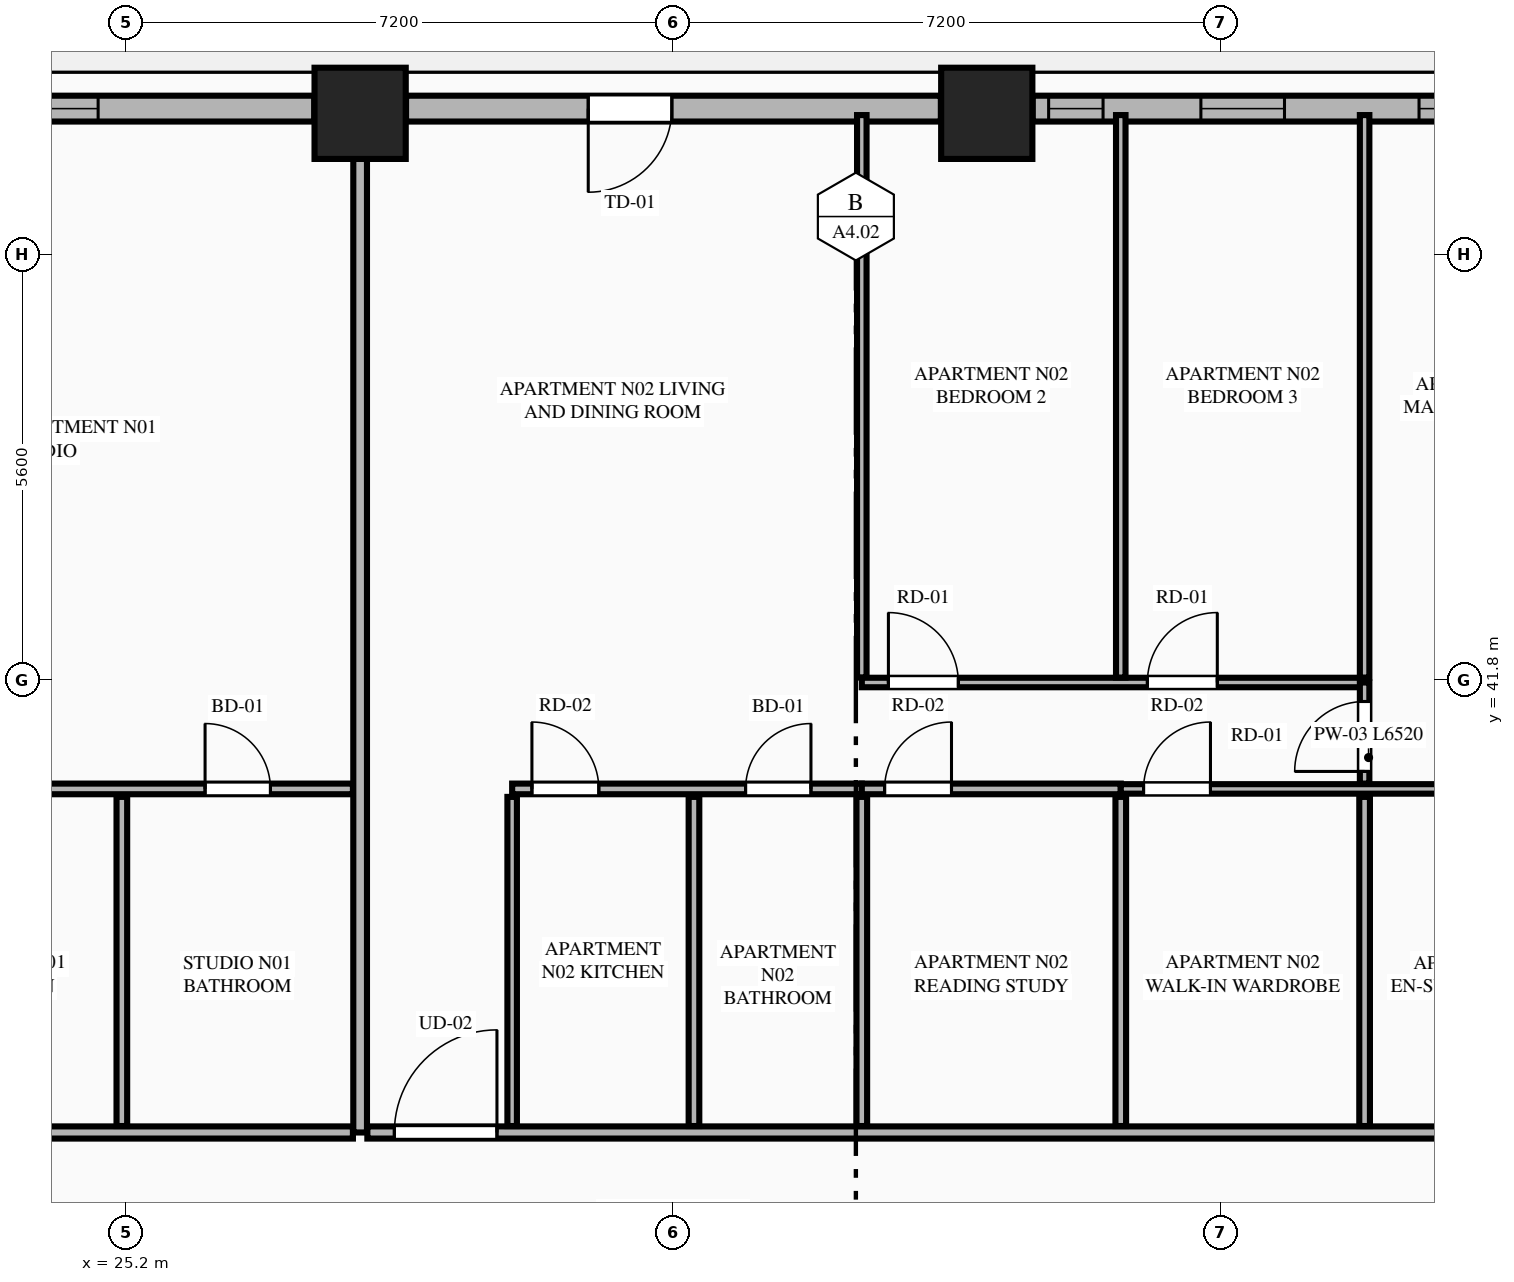
"""IFC4 building model, lengths in metres.
Left out: names, types, materials, properties, quantities, classifications, styles, units other than length and angle.
Written with IfcOpenShell. Run it as: python <this file> out.ifc"""

import sys

from ifc_helpers import new_model, si_unit, direction, frame, frame_2d, origin, origin_2d, place, context, subcontext, project, spatial, rectangle, extrude, element, fill, save


model = new_model("IFC4")
c1 = context("Model", 3, precision=1e-05, world=origin(), true_north=direction((0.0, 1.0)))
c2 = subcontext(c1, "Body", "Model", "MODEL_VIEW")
j1 = project(units=[si_unit("LENGTHUNIT", "METRE"), si_unit("PLANEANGLEUNIT", "RADIAN")], contexts=[c1])
p1 = place(None, origin())
s1 = spatial("IfcSite", under=j1, at=p1, CompositionType="ELEMENT")
p2 = place(p1, origin())
s2 = spatial("IfcBuilding", under=s1, at=p2, CompositionType="ELEMENT")
p3 = place(p2, frame((0.0, 0.0, 49.75)))
s3 = spatial("IfcBuildingStorey", under=s2, at=p3, CompositionType="ELEMENT", Elevation=49.75)
for number, where, z_axis, x_axis in (
    (1, (36.522, 49.258, 0.0), (0.0, 0.0, 1.0), (1.0, 0.0, 0.0)),
    (2, (28.278, 49.258, 0.0), (0.0, 0.0, 1.0), (1.0, 0.0, 0.0)),
):
    element("IfcColumn", number, at=place(p3, frame(where, z_axis=z_axis, x_axis=x_axis)), inside=s3, PredefinedType="COLUMN", context=c2, shape_type="SweptSolid", body=[
        extrude(rectangle(XDim=1.2, YDim=1.2, at=origin_2d()), origin(), (0.0, 0.0, 1.0), 3.55),
    ])
p4 = place(p3, frame((43.913, 49.32, 0.0), z_axis=(0.0, 0.0, 1.0), x_axis=(-1.0, 0.0, 0.0)))
e3 = element("IfcWall", 3, at=p4, inside=s3, PredefinedType="STANDARD", context=c2, shape_type="SweptSolid", body=[
    extrude(rectangle(XDim=6.787, YDim=0.34, at=frame_2d((3.394, 0.0))), origin(), (0.0, 0.0, 1.0), 2.787),
])
p5 = place(p4, frame((0.604, 0.0, 0.75)))
e4 = element("IfcOpeningElement", 4, at=p5, cuts=e3, PredefinedType="OPENING", context=c2, shape_type="SweptSolid", body=[
    extrude(rectangle(XDim=1.1, YDim=1.887, at=frame_2d((0.55, 0.943))), frame((0.0, 0.18, 0.0), z_axis=(0.0, -1.0, 0.0), x_axis=(1.0, 0.0, 0.0)), (0.0, 0.0, 1.0), 0.36),
])
p6 = place(p4, frame((3.474, 0.0, 0.75)))
e5 = element("IfcOpeningElement", 5, at=p6, cuts=e3, PredefinedType="OPENING", context=c2, shape_type="SweptSolid", body=[
    extrude(rectangle(XDim=1.1, YDim=1.887, at=frame_2d((0.55, 0.943))), frame((0.0, 0.18, 0.0), z_axis=(0.0, -1.0, 0.0), x_axis=(1.0, 0.0, 0.0)), (0.0, 0.0, 1.0), 0.36),
])
p7 = place(p4, frame((5.861, 0.0, 0.75)))
e6 = element("IfcOpeningElement", 6, at=p7, cuts=e3, PredefinedType="OPENING", context=c2, shape_type="SweptSolid", body=[
    extrude(rectangle(XDim=0.716, YDim=1.887, at=frame_2d((0.358, 0.943))), frame((0.0, 0.18, 0.0), z_axis=(0.0, -1.0, 0.0), x_axis=(1.0, 0.0, 0.0)), (0.0, 0.0, 1.0), 0.36),
])
p8 = place(p3, frame((35.918, 49.32, 0.0), z_axis=(0.0, 0.0, 1.0), x_axis=(-1.0, 0.0, 0.0)))
e7 = element("IfcWall", 7, at=p8, inside=s3, PredefinedType="STANDARD", context=c2, shape_type="SweptSolid", body=[
    extrude(rectangle(XDim=7.036, YDim=0.34, at=frame_2d((3.518, 0.0))), origin(), (0.0, 0.0, 1.0), 2.787),
])
p9 = place(p8, frame((3.539, 0.0, 0.0)))
e8 = element("IfcOpeningElement", 8, at=p9, cuts=e7, PredefinedType="OPENING", context=c2, shape_type="SweptSolid", body=[
    extrude(rectangle(XDim=1.1, YDim=2.25, at=frame_2d((0.55, 1.125))), frame((0.0, 0.18, 0.0), z_axis=(0.0, -1.0, 0.0), x_axis=(1.0, 0.0, 0.0)), (0.0, 0.0, 1.0), 0.36),
])
p10 = place(p3, frame((27.674, 49.32, 0.0), z_axis=(0.0, 0.0, 1.0), x_axis=(-1.0, 0.0, 0.0)))
e9 = element("IfcWall", 9, at=p10, inside=s3, PredefinedType="STANDARD", context=c2, shape_type="SweptSolid", body=[
    extrude(rectangle(XDim=6.787, YDim=0.34, at=frame_2d((3.394, 0.0))), origin(), (0.0, 0.0, 1.0), 2.787),
])
p11 = place(p10, frame((2.843, 0.0, 0.75)))
e10 = element("IfcOpeningElement", 10, at=p11, cuts=e9, PredefinedType="OPENING", context=c2, shape_type="SweptSolid", body=[
    extrude(rectangle(XDim=1.1, YDim=1.887, at=frame_2d((0.55, 0.943))), frame((0.0, 0.18, 0.0), z_axis=(0.0, -1.0, 0.0), x_axis=(1.0, 0.0, 0.0)), (0.0, 0.0, 1.0), 0.36),
])
p12 = place(p3, frame((28.278, 35.85, 0.0), z_axis=(0.0, 0.0, 1.0), x_axis=(0.0, 1.0, 0.0)))
e11 = element("IfcWall", 11, at=p12, inside=s3, PredefinedType="PARTITIONING", context=c2, shape_type="SweptSolid", body=[
    extrude(rectangle(XDim=13.295, YDim=0.18, at=frame_2d((6.647, 0.0))), origin(), (0.0, 0.0, 1.0), 2.7),
])
p13 = place(p3, frame((19.995, 35.85, 0.0), z_axis=(0.0, 0.0, 1.0), x_axis=(1.0, 0.0, 0.0)))
e12 = element("IfcWall", 12, at=p13, inside=s3, PredefinedType="PARTITIONING", context=c2, shape_type="SweptSolid", body=[
    extrude(rectangle(XDim=8.188, YDim=0.16, at=frame_2d((4.094, 0.0))), origin(), (0.0, 0.0, 1.0), 3.33),
])
p14 = place(p13, frame((0.705, 0.0, 0.0)))
e13 = element("IfcOpeningElement", 13, at=p14, cuts=e12, PredefinedType="OPENING", context=c2, shape_type="SweptSolid", body=[
    extrude(rectangle(XDim=1.02, YDim=2.25, at=frame_2d((0.51, 1.125))), frame((0.0, 0.09, 0.0), z_axis=(0.0, -1.0, 0.0), x_axis=(1.0, 0.0, 0.0)), (0.0, 0.0, 1.0), 0.18),
])
p15 = place(p3, frame((22.25, 40.37, 0.0), z_axis=(0.0, 0.0, 1.0), x_axis=(1.0, 0.0, 0.0)))
e14 = element("IfcWall", 14, at=p15, inside=s3, PredefinedType="PLUMBINGWALL", context=c2, shape_type="SweptSolid", body=[
    extrude(rectangle(XDim=5.933, YDim=0.14, at=frame_2d((2.967, 0.0))), origin(), (0.0, 0.0, 1.0), 3.33),
])
p16 = place(p15, frame((3.988, 0.0, 0.0)))
e15 = element("IfcOpeningElement", 15, at=p16, cuts=e14, PredefinedType="OPENING", context=c2, shape_type="SweptSolid", body=[
    extrude(rectangle(XDim=0.86, YDim=2.1, at=frame_2d((0.43, 1.05))), frame((0.0, 0.08, 0.0), z_axis=(0.0, -1.0, 0.0), x_axis=(1.0, 0.0, 0.0)), (0.0, 0.0, 1.0), 0.16),
])
p17 = place(p15, frame((0.22, 0.0, 0.0)))
e16 = element("IfcOpeningElement", 16, at=p17, cuts=e14, PredefinedType="OPENING", context=c2, shape_type="SweptSolid", body=[
    extrude(rectangle(XDim=0.88, YDim=2.15, at=frame_2d((0.44, 1.075))), frame((0.0, 0.08, 0.0), z_axis=(0.0, -1.0, 0.0), x_axis=(1.0, 0.0, 0.0)), (0.0, 0.0, 1.0), 0.16),
])
p18 = place(p3, frame((25.143, 35.935, 0.0), z_axis=(0.0, 0.0, 1.0), x_axis=(0.0, 1.0, 0.0)))
e17 = element("IfcWall", 17, at=p18, inside=s3, PredefinedType="PLUMBINGWALL", context=c2, shape_type="SweptSolid", body=[
    extrude(rectangle(XDim=4.33, YDim=0.14, at=frame_2d((2.165, 0.0))), origin(), (0.0, 0.0, 1.0), 3.33),
])
p19 = place(p3, frame((28.373, 35.85, 0.0), z_axis=(0.0, 0.0, 1.0), x_axis=(1.0, 0.0, 0.0)))
e18 = element("IfcWall", 18, at=p19, inside=s3, PredefinedType="PARTITIONING", context=c2, shape_type="SweptSolid", body=[
    extrude(rectangle(XDim=16.432, YDim=0.16, at=frame_2d((8.216, 0.0))), origin(), (0.0, 0.0, 1.0), 3.33),
])
p20 = place(p19, frame((0.355, 0.0, 0.0)))
e19 = element("IfcOpeningElement", 19, at=p20, cuts=e18, PredefinedType="OPENING", context=c2, shape_type="SweptSolid", body=[
    extrude(rectangle(XDim=1.35, YDim=2.35, at=frame_2d((0.675, 1.175))), frame((0.0, 0.09, 0.0), z_axis=(0.0, -1.0, 0.0), x_axis=(1.0, 0.0, 0.0)), (0.0, 0.0, 1.0), 0.18),
])
p21 = place(p3, frame((30.278, 35.935, 0.0), z_axis=(0.0, 0.0, 1.0), x_axis=(0.0, 1.0, 0.0)))
e20 = element("IfcWall", 20, at=p21, inside=s3, PredefinedType="PARTITIONING", context=c2, shape_type="SweptSolid", body=[
    extrude(rectangle(XDim=4.33, YDim=0.125, at=frame_2d((2.165, 0.0))), origin(), (0.0, 0.0, 1.0), 3.33),
])
p22 = place(p3, frame((30.278, 40.37, 0.0), z_axis=(0.0, 0.0, 1.0), x_axis=(1.0, 0.0, 0.0)))
e21 = element("IfcWall", 21, at=p22, inside=s3, PredefinedType="PLUMBINGWALL", context=c2, shape_type="SweptSolid", body=[
    extrude(rectangle(XDim=4.6, YDim=0.14, at=frame_2d((2.3, 0.0))), origin(), (0.0, 0.0, 1.0), 3.33),
])
p23 = place(p22, frame((3.071, 0.0, 0.0)))
e22 = element("IfcOpeningElement", 22, at=p23, cuts=e21, PredefinedType="OPENING", context=c2, shape_type="SweptSolid", body=[
    extrude(rectangle(XDim=0.86, YDim=2.1, at=frame_2d((0.43, 1.05))), frame((0.0, 0.08, 0.0), z_axis=(0.0, -1.0, 0.0), x_axis=(1.0, 0.0, 0.0)), (0.0, 0.0, 1.0), 0.16),
])
p24 = place(p22, frame((0.26, 0.0, 0.0)))
e23 = element("IfcOpeningElement", 23, at=p24, cuts=e21, PredefinedType="OPENING", context=c2, shape_type="SweptSolid", body=[
    extrude(rectangle(XDim=0.88, YDim=2.15, at=frame_2d((0.44, 1.075))), frame((0.0, 0.08, 0.0), z_axis=(0.0, -1.0, 0.0), x_axis=(1.0, 0.0, 0.0)), (0.0, 0.0, 1.0), 0.16),
])
p25 = place(p3, frame((34.878, 40.37, 0.0), z_axis=(0.0, 0.0, 1.0), x_axis=(1.0, 0.0, 0.0)))
e24 = element("IfcWall", 24, at=p25, inside=s3, PredefinedType="PLUMBINGWALL", context=c2, shape_type="SweptSolid", body=[
    extrude(rectangle(XDim=3.407, YDim=0.14, at=frame_2d((1.704, 0.0))), origin(), (0.0, 0.0, 1.0), 3.33),
])
p26 = place(p25, frame((0.3, 0.0, 0.0)))
e25 = element("IfcOpeningElement", 25, at=p26, cuts=e24, PredefinedType="OPENING", context=c2, shape_type="SweptSolid", body=[
    extrude(rectangle(XDim=0.88, YDim=2.15, at=frame_2d((0.44, 1.075))), frame((0.0, 0.08, 0.0), z_axis=(0.0, -1.0, 0.0), x_axis=(1.0, 0.0, 0.0)), (0.0, 0.0, 1.0), 0.16),
])
p27 = place(p3, frame((38.285, 40.37, 0.0), z_axis=(0.0, 0.0, 1.0), x_axis=(1.0, 0.0, 0.0)))
e26 = element("IfcWall", 26, at=p27, inside=s3, PredefinedType="PARTITIONING", context=c2, shape_type="SweptSolid", body=[
    extrude(rectangle(XDim=6.52, YDim=0.125, at=frame_2d((3.26, 0.0))), origin(), (0.0, 0.0, 1.0), 3.33),
])
p28 = place(p27, frame((4.439, 0.0, 0.0)))
e27 = element("IfcOpeningElement", 27, at=p28, cuts=e26, PredefinedType="OPENING", context=c2, shape_type="SweptSolid", body=[
    extrude(rectangle(XDim=0.86, YDim=2.1, at=frame_2d((0.43, 1.05))), frame((0.0, 0.073, 0.0), z_axis=(0.0, -1.0, 0.0), x_axis=(1.0, 0.0, 0.0)), (0.0, 0.0, 1.0), 0.145),
])
p29 = place(p27, frame((0.3, 0.0, 0.0)))
e28 = element("IfcOpeningElement", 28, at=p29, cuts=e26, PredefinedType="OPENING", context=c2, shape_type="SweptSolid", body=[
    extrude(rectangle(XDim=0.88, YDim=2.15, at=frame_2d((0.44, 1.075))), frame((0.0, 0.073, 0.0), z_axis=(0.0, -1.0, 0.0), x_axis=(1.0, 0.0, 0.0)), (0.0, 0.0, 1.0), 0.145),
])
p30 = place(p3, frame((32.67, 35.935, 0.0), z_axis=(0.0, 0.0, 1.0), x_axis=(0.0, 1.0, 0.0)))
e29 = element("IfcWall", 29, at=p30, inside=s3, PredefinedType="PLUMBINGWALL", context=c2, shape_type="SweptSolid", body=[
    extrude(rectangle(XDim=4.33, YDim=0.14, at=frame_2d((2.165, 0.0))), origin(), (0.0, 0.0, 1.0), 3.33),
])
p31 = place(p3, frame((34.878, 41.835, 0.0), z_axis=(0.0, 0.0, 1.0), x_axis=(0.0, 1.0, 0.0)))
e30 = element("IfcWall", 30, at=p31, inside=s3, PredefinedType="PARTITIONING", context=c2, shape_type="SweptSolid", body=[
    extrude(rectangle(XDim=7.4, YDim=0.125, at=frame_2d((3.7, 0.0))), origin(), (0.0, 0.0, 1.0), 3.33),
])
p32 = place(p3, frame((34.878, 41.77, 0.0), z_axis=(0.0, 0.0, 1.0), x_axis=(1.0, 0.0, 0.0)))
e31 = element("IfcWall", 31, at=p32, inside=s3, PredefinedType="PARTITIONING", context=c2, shape_type="SweptSolid", body=[
    extrude(rectangle(XDim=6.615, YDim=0.125, at=frame_2d((3.308, 0.0))), origin(), (0.0, 0.0, 1.0), 3.33),
])
p33 = place(p32, frame((0.35, 0.0, 0.0)))
e32 = element("IfcOpeningElement", 32, at=p33, cuts=e31, PredefinedType="OPENING", context=c2, shape_type="SweptSolid", body=[
    extrude(rectangle(XDim=0.92, YDim=2.15, at=frame_2d((0.46, 1.075))), frame((0.0, 0.073, 0.0), z_axis=(0.0, -1.0, 0.0), x_axis=(1.0, 0.0, 0.0)), (0.0, 0.0, 1.0), 0.145),
])
p34 = place(p32, frame((3.757, 0.0, 0.0)))
e33 = element("IfcOpeningElement", 33, at=p34, cuts=e31, PredefinedType="OPENING", context=c2, shape_type="SweptSolid", body=[
    extrude(rectangle(XDim=0.92, YDim=2.15, at=frame_2d((0.46, 1.075))), frame((0.0, 0.073, 0.0), z_axis=(0.0, -1.0, 0.0), x_axis=(1.0, 0.0, 0.0)), (0.0, 0.0, 1.0), 0.145),
])
p35 = place(p3, frame((41.493, 40.44, 0.0), z_axis=(0.0, 0.0, 1.0), x_axis=(0.0, 1.0, 0.0)))
e34 = element("IfcWall", 34, at=p35, inside=s3, PredefinedType="PARTITIONING", context=c2, shape_type="SweptSolid", body=[
    extrude(rectangle(XDim=1.33, YDim=0.125, at=frame_2d((0.665, 0.0))), origin(), (0.0, 0.0, 1.0), 3.33),
])
p36 = place(p35, frame((0.16, 0.0, 0.0)))
e35 = element("IfcOpeningElement", 35, at=p36, cuts=e34, PredefinedType="OPENING", context=c2, shape_type="SweptSolid", body=[
    extrude(rectangle(XDim=0.92, YDim=2.15, at=frame_2d((0.46, 1.075))), frame((0.0, 0.073, 0.0), z_axis=(0.0, -1.0, 0.0), x_axis=(1.0, 0.0, 0.0)), (0.0, 0.0, 1.0), 0.145),
])
for number, where, z_axis, x_axis in (
    (36, (34.878, 35.935, 0.0), (0.0, 0.0, 1.0), (0.0, 1.0, 0.0)),
    (37, (38.285, 35.935, 0.0), (0.0, 0.0, 1.0), (0.0, 1.0, 0.0)),
):
    element("IfcWall", number, at=place(p3, frame(where, z_axis=z_axis, x_axis=x_axis)), inside=s3, PredefinedType="PLUMBINGWALL", context=c2, shape_type="SweptSolid", body=[
        extrude(rectangle(XDim=4.33, YDim=0.14, at=frame_2d((2.165, 0.0))), origin(), (0.0, 0.0, 1.0), 3.33),
    ])
for number, where, z_axis, x_axis in (
    (38, (38.285, 41.835, 0.0), (0.0, 0.0, 1.0), (0.0, 1.0, 0.0)),
    (39, (41.493, 41.835, 0.0), (0.0, 0.0, 1.0), (0.0, 1.0, 0.0)),
):
    element("IfcWall", number, at=place(p3, frame(where, z_axis=z_axis, x_axis=x_axis)), inside=s3, PredefinedType="PARTITIONING", context=c2, shape_type="SweptSolid", body=[
        extrude(rectangle(XDim=7.4, YDim=0.125, at=frame_2d((3.7, 0.0))), origin(), (0.0, 0.0, 1.0), 3.33),
    ])
p37 = place(p3, frame((41.493, 35.935, 0.0), z_axis=(0.0, 0.0, 1.0), x_axis=(0.0, 1.0, 0.0)))
e40 = element("IfcWall", 40, at=p37, inside=s3, PredefinedType="PLUMBINGWALL", context=c2, shape_type="SweptSolid", body=[
    extrude(rectangle(XDim=4.33, YDim=0.14, at=frame_2d((2.165, 0.0))), origin(), (0.0, 0.0, 1.0), 3.33),
])
p38 = place(p5, origin())
e41 = element("IfcWindow", 41, at=p38, inside=s3, PartitioningType="SINGLE_PANEL", PredefinedType="WINDOW", context=c2, shape_type="SweptSolid", body=[
    extrude(rectangle(XDim=1.1, YDim=1.887, at=frame_2d((0.55, 0.943))), frame((0.0, 0.03, 0.0), z_axis=(0.0, -1.0, 0.0), x_axis=(1.0, 0.0, 0.0)), (0.0, 0.0, 1.0), 0.06),
])
fill(e4, e41)
p39 = place(p9, origin())
e42 = element("IfcDoor", 42, at=p39, inside=s3, OperationType="SINGLE_SWING_RIGHT", PredefinedType="DOOR", context=c2, shape_type="SweptSolid", body=[
    extrude(rectangle(XDim=1.1, YDim=2.25, at=frame_2d((0.55, 1.125))), frame((0.0, 0.025, 0.0), z_axis=(0.0, -1.0, 0.0), x_axis=(1.0, 0.0, 0.0)), (0.0, 0.0, 1.0), 0.05),
])
fill(e8, e42)
p40 = place(p11, origin())
e43 = element("IfcWindow", 43, at=p40, inside=s3, PartitioningType="SINGLE_PANEL", PredefinedType="WINDOW", context=c2, shape_type="SweptSolid", body=[
    extrude(rectangle(XDim=1.1, YDim=1.887, at=frame_2d((0.55, 0.943))), frame((0.0, 0.03, 0.0), z_axis=(0.0, -1.0, 0.0), x_axis=(1.0, 0.0, 0.0)), (0.0, 0.0, 1.0), 0.06),
])
fill(e10, e43)
p41 = place(p16, origin())
e44 = element("IfcDoor", 44, at=p41, inside=s3, OperationType="SINGLE_SWING_LEFT", PredefinedType="DOOR", context=c2, shape_type="SweptSolid", body=[
    extrude(rectangle(XDim=0.86, YDim=2.1, at=frame_2d((0.43, 1.05))), frame((0.0, 0.025, 0.0), z_axis=(0.0, -1.0, 0.0), x_axis=(1.0, 0.0, 0.0)), (0.0, 0.0, 1.0), 0.05),
])
fill(e15, e44)
p42 = place(p23, origin())
e45 = element("IfcDoor", 45, at=p42, inside=s3, OperationType="SINGLE_SWING_RIGHT", PredefinedType="DOOR", context=c2, shape_type="SweptSolid", body=[
    extrude(rectangle(XDim=0.86, YDim=2.1, at=frame_2d((0.43, 1.05))), frame((0.0, 0.025, 0.0), z_axis=(0.0, -1.0, 0.0), x_axis=(1.0, 0.0, 0.0)), (0.0, 0.0, 1.0), 0.05),
])
fill(e22, e45)
p43 = place(p20, origin())
e46 = element("IfcDoor", 46, at=p43, inside=s3, OperationType="SINGLE_SWING_RIGHT", PredefinedType="DOOR", context=c2, shape_type="SweptSolid", body=[
    extrude(rectangle(XDim=1.35, YDim=2.35, at=frame_2d((0.675, 1.175))), frame((0.0, 0.025, 0.0), z_axis=(0.0, -1.0, 0.0), x_axis=(1.0, 0.0, 0.0)), (0.0, 0.0, 1.0), 0.05),
])
fill(e19, e46)
p44 = place(p24, origin())
e47 = element("IfcDoor", 47, at=p44, inside=s3, OperationType="SINGLE_SWING_LEFT", PredefinedType="DOOR", context=c2, shape_type="SweptSolid", body=[
    extrude(rectangle(XDim=0.88, YDim=2.15, at=frame_2d((0.44, 1.075))), frame((0.0, 0.025, 0.0), z_axis=(0.0, -1.0, 0.0), x_axis=(1.0, 0.0, 0.0)), (0.0, 0.0, 1.0), 0.05),
])
fill(e23, e47)
p45 = place(p26, origin())
e48 = element("IfcDoor", 48, at=p45, inside=s3, OperationType="SINGLE_SWING_RIGHT", PredefinedType="DOOR", context=c2, shape_type="SweptSolid", body=[
    extrude(rectangle(XDim=0.88, YDim=2.15, at=frame_2d((0.44, 1.075))), frame((0.0, 0.025, 0.0), z_axis=(0.0, -1.0, 0.0), x_axis=(1.0, 0.0, 0.0)), (0.0, 0.0, 1.0), 0.05),
])
fill(e25, e48)
p46 = place(p33, origin())
e49 = element("IfcDoor", 49, at=p46, inside=s3, OperationType="SINGLE_SWING_LEFT", PredefinedType="DOOR", context=c2, shape_type="SweptSolid", body=[
    extrude(rectangle(XDim=0.92, YDim=2.15, at=frame_2d((0.46, 1.075))), frame((0.0, 0.025, 0.0), z_axis=(0.0, -1.0, 0.0), x_axis=(1.0, 0.0, 0.0)), (0.0, 0.0, 1.0), 0.05),
])
fill(e32, e49)
p47 = place(p34, origin())
e50 = element("IfcDoor", 50, at=p47, inside=s3, OperationType="SINGLE_SWING_RIGHT", PredefinedType="DOOR", context=c2, shape_type="SweptSolid", body=[
    extrude(rectangle(XDim=0.92, YDim=2.15, at=frame_2d((0.46, 1.075))), frame((0.0, 0.025, 0.0), z_axis=(0.0, -1.0, 0.0), x_axis=(1.0, 0.0, 0.0)), (0.0, 0.0, 1.0), 0.05),
])
fill(e33, e50)
p48 = place(p36, origin())
e51 = element("IfcDoor", 51, at=p48, inside=s3, OperationType="SINGLE_SWING_LEFT", PredefinedType="DOOR", context=c2, shape_type="SweptSolid", body=[
    extrude(rectangle(XDim=0.92, YDim=2.15, at=frame_2d((0.46, 1.075))), frame((0.0, 0.025, 0.0), z_axis=(0.0, -1.0, 0.0), x_axis=(1.0, 0.0, 0.0)), (0.0, 0.0, 1.0), 0.05),
])
fill(e35, e51)
p49 = place(p29, origin())
e52 = element("IfcDoor", 52, at=p49, inside=s3, OperationType="SINGLE_SWING_RIGHT", PredefinedType="DOOR", context=c2, shape_type="SweptSolid", body=[
    extrude(rectangle(XDim=0.88, YDim=2.15, at=frame_2d((0.44, 1.075))), frame((0.0, 0.025, 0.0), z_axis=(0.0, -1.0, 0.0), x_axis=(1.0, 0.0, 0.0)), (0.0, 0.0, 1.0), 0.05),
])
fill(e28, e52)
p50 = place(p6, origin())
e53 = element("IfcWindow", 53, at=p50, inside=s3, PartitioningType="SINGLE_PANEL", PredefinedType="WINDOW", context=c2, shape_type="SweptSolid", body=[
    extrude(rectangle(XDim=1.1, YDim=1.887, at=frame_2d((0.55, 0.943))), frame((0.0, 0.03, 0.0), z_axis=(0.0, -1.0, 0.0), x_axis=(1.0, 0.0, 0.0)), (0.0, 0.0, 1.0), 0.06),
])
fill(e5, e53)
p51 = place(p7, origin())
e54 = element("IfcWindow", 54, at=p51, inside=s3, PartitioningType="SINGLE_PANEL", PredefinedType="WINDOW", context=c2, shape_type="SweptSolid", body=[
    extrude(rectangle(XDim=0.716, YDim=1.887, at=frame_2d((0.358, 0.943))), frame((0.0, 0.03, 0.0), z_axis=(0.0, -1.0, 0.0), x_axis=(1.0, 0.0, 0.0)), (0.0, 0.0, 1.0), 0.06),
])
fill(e6, e54)
save(model, sys.argv[1])
